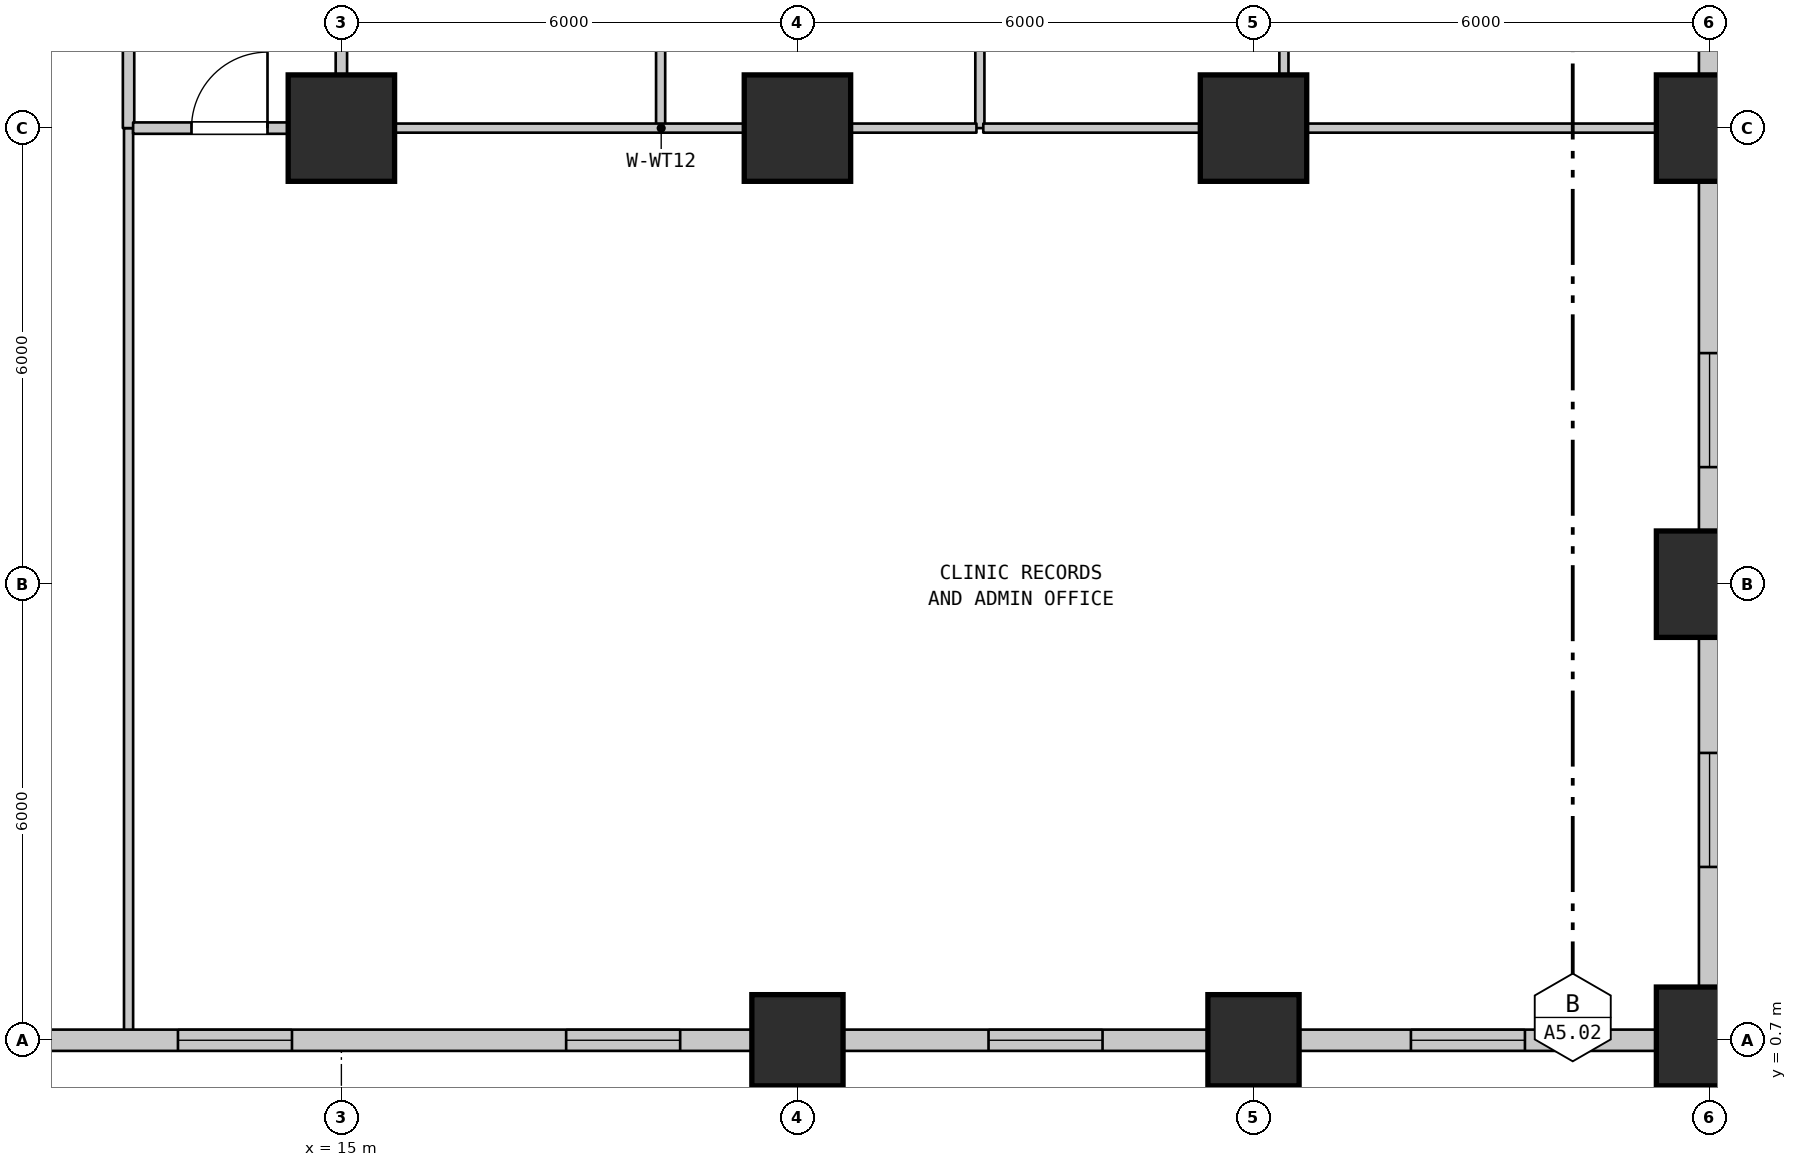
"""IFC4 building model, lengths in metres.
Left out: names, types, materials, properties, quantities, classifications, styles, units other than length and angle.
Written with IfcOpenShell. Run it as: python <this file> out.ifc"""

import sys

from ifc_helpers import new_model, si_unit, direction, frame, frame_2d, origin, origin_2d, place, context, subcontext, project, spatial, rectangle, extrude, element, fill, save


model = new_model("IFC4")
c1 = context("Model", 3, precision=1e-05, world=origin(), true_north=direction((0.0, 1.0)))
c2 = subcontext(c1, "Body", "Model", "MODEL_VIEW")
j1 = project(units=[si_unit("LENGTHUNIT", "METRE"), si_unit("PLANEANGLEUNIT", "RADIAN")], contexts=[c1])
p1 = place(None, origin())
s1 = spatial("IfcSite", under=j1, at=p1, CompositionType="ELEMENT")
p2 = place(p1, origin())
s2 = spatial("IfcBuilding", under=s1, at=p2, CompositionType="ELEMENT")
p3 = place(p2, frame((0.0, 0.0, 13.0)))
s3 = spatial("IfcBuildingStorey", under=s2, at=p3, CompositionType="ELEMENT", Elevation=13.0)
p4 = place(p3, frame((15.0, 12.7, 0.0), z_axis=(0.0, 0.0, 1.0), x_axis=(1.0, 0.0, 0.0)))
e1 = element("IfcColumn", 1, at=p4, inside=s3, PredefinedType="COLUMN", context=c2, shape_type="SweptSolid", body=[
    extrude(rectangle(XDim=1.4, YDim=1.4, at=origin_2d()), origin(), (0.0, 0.0, 1.0), 6.0),
])
p5 = place(p3, frame((21.0, 0.7, 0.0), z_axis=(0.0, 0.0, 1.0), x_axis=(1.0, 0.0, 0.0)))
e2 = element("IfcColumn", 2, at=p5, inside=s3, PredefinedType="PILASTER", context=c2, shape_type="SweptSolid", body=[
    extrude(rectangle(XDim=1.2, YDim=1.2, at=origin_2d()), origin(), (0.0, 0.0, 1.0), 6.0),
])
p6 = place(p3, frame((21.0, 12.7, 0.0), z_axis=(0.0, 0.0, 1.0), x_axis=(1.0, 0.0, 0.0)))
e3 = element("IfcColumn", 3, at=p6, inside=s3, PredefinedType="COLUMN", context=c2, shape_type="SweptSolid", body=[
    extrude(rectangle(XDim=1.4, YDim=1.4, at=origin_2d()), origin(), (0.0, 0.0, 1.0), 6.0),
])
p7 = place(p3, frame((27.0, 0.7, 0.0), z_axis=(0.0, 0.0, 1.0), x_axis=(1.0, 0.0, 0.0)))
e4 = element("IfcColumn", 4, at=p7, inside=s3, PredefinedType="PILASTER", context=c2, shape_type="SweptSolid", body=[
    extrude(rectangle(XDim=1.2, YDim=1.2, at=origin_2d()), origin(), (0.0, 0.0, 1.0), 6.0),
])
p8 = place(p3, frame((27.0, 12.7, 0.0), z_axis=(0.0, 0.0, 1.0), x_axis=(1.0, 0.0, 0.0)))
e5 = element("IfcColumn", 5, at=p8, inside=s3, PredefinedType="COLUMN", context=c2, shape_type="SweptSolid", body=[
    extrude(rectangle(XDim=1.4, YDim=1.4, at=origin_2d()), origin(), (0.0, 0.0, 1.0), 6.0),
])
for number, where, z_axis, x_axis in (
    (6, (33.0, 0.7, 0.0), (0.0, 0.0, 1.0), (1.0, 0.0, 0.0)),
    (7, (33.0, 6.7, 0.0), (0.0, 0.0, 1.0), (1.0, 0.0, 0.0)),
    (8, (33.0, 12.7, 0.0), (0.0, 0.0, 1.0), (1.0, 0.0, 0.0)),
):
    element("IfcColumn", number, at=place(p3, frame(where, z_axis=z_axis, x_axis=x_axis)), inside=s3, PredefinedType="PILASTER", context=c2, shape_type="SweptSolid", body=[
        extrude(rectangle(XDim=1.4, YDim=1.4, at=origin_2d()), origin(), (0.0, 0.0, 1.0), 6.0),
    ])
p9 = place(p3, frame((33.0, 0.7, 0.0), z_axis=(0.0, 0.0, 1.0), x_axis=(-1.0, 0.0, 0.0)))
e9 = element("IfcWall", 9, at=p9, inside=s3, PredefinedType="STANDARD", context=c2, shape_type="SweptSolid", body=[
    extrude(rectangle(XDim=6.0, YDim=0.28, at=frame_2d((3.0, 0.0))), origin(), (0.0, 0.0, 1.0), 4.98),
])
p10 = place(p9, frame((2.429, 0.0, 0.95)))
e10 = element("IfcOpeningElement", 10, at=p10, cuts=e9, PredefinedType="OPENING", context=c2, shape_type="SweptSolid", body=[
    extrude(rectangle(XDim=1.5, YDim=1.8, at=frame_2d((0.75, 0.9))), frame((0.0, 0.15, 0.0), z_axis=(0.0, -1.0, 0.0), x_axis=(1.0, 0.0, 0.0)), (0.0, 0.0, 1.0), 0.3),
])
p11 = place(p3, frame((12.2, 0.71, 0.0), z_axis=(0.0, 0.0, 1.0), x_axis=(0.0, 1.0, 0.0)))
e11 = element("IfcWall", 11, at=p11, inside=s3, PredefinedType="PARTITIONING", context=c2, shape_type="SweptSolid", body=[
    extrude(rectangle(XDim=11.99, YDim=0.12, at=frame_2d((5.995, 0.0))), origin(), (0.0, 0.0, 1.0), 5.58),
])
p12 = place(p3, frame((12.2, 12.7, 0.0), z_axis=(0.0, 0.0, 1.0), x_axis=(0.0, 1.0, 0.0)))
e12 = element("IfcWall", 12, at=p12, inside=s3, PredefinedType="STANDARD", context=c2, shape_type="SweptSolid", body=[
    extrude(rectangle(XDim=4.8, YDim=0.15, at=frame_2d((2.4, 0.0))), origin(), (0.0, 0.0, 1.0), 5.58),
])
p13 = place(p12, frame((1.529, 0.0, 0.0)))
e13 = element("IfcOpeningElement", 13, at=p13, cuts=e12, PredefinedType="OPENING", context=c2, shape_type="SweptSolid", body=[
    extrude(rectangle(XDim=1.45, YDim=2.2, at=frame_2d((0.725, 1.1))), frame((0.0, 0.085, 0.0), z_axis=(0.0, -1.0, 0.0), x_axis=(1.0, 0.0, 0.0)), (0.0, 0.0, 1.0), 0.17),
])
p14 = place(p3, frame((15.0, 12.7, 0.0), z_axis=(0.0, 0.0, 1.0), x_axis=(0.0, 1.0, 0.0)))
e14 = element("IfcWall", 14, at=p14, inside=s3, PredefinedType="STANDARD", context=c2, shape_type="SweptSolid", body=[
    extrude(rectangle(XDim=4.8, YDim=0.15, at=frame_2d((2.4, 0.0))), origin(), (0.0, 0.0, 1.0), 5.08),
])
for number, where, z_axis, x_axis in (
    (15, (19.2, 12.7, 0.0), (0.0, 0.0, 1.0), (0.0, 1.0, 0.0)),
    (16, (23.4, 12.7, 0.0), (0.0, 0.0, 1.0), (0.0, 1.0, 0.0)),
    (17, (27.4, 12.7, 0.0), (0.0, 0.0, 1.0), (0.0, 1.0, 0.0)),
):
    element("IfcWall", number, at=place(p3, frame(where, z_axis=z_axis, x_axis=x_axis)), inside=s3, PredefinedType="PARTITIONING", context=c2, shape_type="SweptSolid", body=[
        extrude(rectangle(XDim=4.8, YDim=0.12, at=frame_2d((2.4, 0.0))), origin(), (0.0, 0.0, 1.0), 5.58),
    ])
p15 = place(p3, frame((12.26, 12.7, 0.0), z_axis=(0.0, 0.0, 1.0), x_axis=(1.0, 0.0, 0.0)))
e18 = element("IfcWall", 18, at=p15, inside=s3, PredefinedType="STANDARD", context=c2, shape_type="SweptSolid", body=[
    extrude(rectangle(XDim=2.68, YDim=0.15, at=frame_2d((1.34, 0.0))), origin(), (0.0, 0.0, 1.0), 5.58),
])
p16 = place(p15, frame((0.768, 0.0, 0.0)))
e19 = element("IfcOpeningElement", 19, at=p16, cuts=e18, PredefinedType="OPENING", context=c2, shape_type="SweptSolid", body=[
    extrude(rectangle(XDim=1.0, YDim=2.15, at=frame_2d((0.5, 1.075))), frame((0.0, 0.085, 0.0), z_axis=(0.0, -1.0, 0.0), x_axis=(1.0, 0.0, 0.0)), (0.0, 0.0, 1.0), 0.17),
])
p17 = place(p3, frame((15.06, 12.7, 0.0), z_axis=(0.0, 0.0, 1.0), x_axis=(1.0, 0.0, 0.0)))
e20 = element("IfcWall", 20, at=p17, inside=s3, PredefinedType="PARTITIONING", context=c2, shape_type="SweptSolid", body=[
    extrude(rectangle(XDim=8.295, YDim=0.12, at=frame_2d((4.147, 0.0))), origin(), (0.0, 0.0, 1.0), 4.98),
])
p18 = place(p3, frame((23.445, 12.7, 0.0), z_axis=(0.0, 0.0, 1.0), x_axis=(1.0, 0.0, 0.0)))
e21 = element("IfcWall", 21, at=p18, inside=s3, PredefinedType="PARTITIONING", context=c2, shape_type="SweptSolid", body=[
    extrude(rectangle(XDim=3.91, YDim=0.12, at=frame_2d((1.955, 0.0))), origin(), (0.0, 0.0, 1.0), 4.98),
])
p19 = place(p3, frame((27.445, 12.7, 0.0), z_axis=(0.0, 0.0, 1.0), x_axis=(1.0, 0.0, 0.0)))
e22 = element("IfcWall", 22, at=p19, inside=s3, PredefinedType="PARTITIONING", context=c2, shape_type="SweptSolid", body=[
    extrude(rectangle(XDim=5.545, YDim=0.12, at=frame_2d((2.772, 0.0))), origin(), (0.0, 0.0, 1.0), 4.98),
])
p20 = place(p3, frame((33.0, 37.9, 0.0), z_axis=(0.0, 0.0, 1.0), x_axis=(0.0, -1.0, 0.0)))
e23 = element("IfcWall", 23, at=p20, inside=s3, PredefinedType="STANDARD", context=c2, shape_type="SweptSolid", body=[
    extrude(rectangle(XDim=37.2, YDim=0.28, at=frame_2d((18.6, 0.0))), origin(), (0.0, 0.0, 1.0), 5.08),
])
p21 = place(p20, frame((1.86, 0.0, 0.95)))
e24 = element("IfcOpeningElement", 24, at=p21, cuts=e23, PredefinedType="OPENING", context=c2, shape_type="SweptSolid", body=[
    extrude(rectangle(XDim=1.5, YDim=1.8, at=frame_2d((0.75, 0.9))), frame((0.0, 0.15, 0.0), z_axis=(0.0, -1.0, 0.0), x_axis=(1.0, 0.0, 0.0)), (0.0, 0.0, 1.0), 0.3),
])
p22 = place(p20, frame((7.12, 0.0, 0.95)))
e25 = element("IfcOpeningElement", 25, at=p22, cuts=e23, PredefinedType="OPENING", context=c2, shape_type="SweptSolid", body=[
    extrude(rectangle(XDim=1.5, YDim=1.8, at=frame_2d((0.75, 0.9))), frame((0.0, 0.15, 0.0), z_axis=(0.0, -1.0, 0.0), x_axis=(1.0, 0.0, 0.0)), (0.0, 0.0, 1.0), 0.3),
])
p23 = place(p20, frame((12.38, 0.0, 0.95)))
e26 = element("IfcOpeningElement", 26, at=p23, cuts=e23, PredefinedType="OPENING", context=c2, shape_type="SweptSolid", body=[
    extrude(rectangle(XDim=1.5, YDim=1.8, at=frame_2d((0.75, 0.9))), frame((0.0, 0.15, 0.0), z_axis=(0.0, -1.0, 0.0), x_axis=(1.0, 0.0, 0.0)), (0.0, 0.0, 1.0), 0.3),
])
p24 = place(p20, frame((17.19, 0.0, 0.95)))
e27 = element("IfcOpeningElement", 27, at=p24, cuts=e23, PredefinedType="OPENING", context=c2, shape_type="SweptSolid", body=[
    extrude(rectangle(XDim=1.5, YDim=1.8, at=frame_2d((0.75, 0.9))), frame((0.0, 0.15, 0.0), z_axis=(0.0, -1.0, 0.0), x_axis=(1.0, 0.0, 0.0)), (0.0, 0.0, 1.0), 0.3),
])
p25 = place(p20, frame((22.45, 0.0, 0.95)))
e28 = element("IfcOpeningElement", 28, at=p25, cuts=e23, PredefinedType="OPENING", context=c2, shape_type="SweptSolid", body=[
    extrude(rectangle(XDim=1.5, YDim=1.8, at=frame_2d((0.75, 0.9))), frame((0.0, 0.15, 0.0), z_axis=(0.0, -1.0, 0.0), x_axis=(1.0, 0.0, 0.0)), (0.0, 0.0, 1.0), 0.3),
])
p26 = place(p20, frame((28.16, 0.0, 0.95)))
e29 = element("IfcOpeningElement", 29, at=p26, cuts=e23, PredefinedType="OPENING", context=c2, shape_type="SweptSolid", body=[
    extrude(rectangle(XDim=1.5, YDim=1.8, at=frame_2d((0.75, 0.9))), frame((0.0, 0.15, 0.0), z_axis=(0.0, -1.0, 0.0), x_axis=(1.0, 0.0, 0.0)), (0.0, 0.0, 1.0), 0.3),
])
p27 = place(p20, frame((33.42, 0.0, 0.95)))
e30 = element("IfcOpeningElement", 30, at=p27, cuts=e23, PredefinedType="OPENING", context=c2, shape_type="SweptSolid", body=[
    extrude(rectangle(XDim=1.5, YDim=1.8, at=frame_2d((0.75, 0.9))), frame((0.0, 0.15, 0.0), z_axis=(0.0, -1.0, 0.0), x_axis=(1.0, 0.0, 0.0)), (0.0, 0.0, 1.0), 0.3),
])
p28 = place(p3, frame((27.0, 0.7, 0.0), z_axis=(0.0, 0.0, 1.0), x_axis=(-1.0, 0.0, 0.0)))
e31 = element("IfcWall", 31, at=p28, inside=s3, PredefinedType="STANDARD", context=c2, shape_type="SweptSolid", body=[
    extrude(rectangle(XDim=22.586, YDim=0.28, at=frame_2d((11.293, 0.0))), origin(), (0.0, 0.0, 1.0), 5.58),
])
p29 = place(p28, frame((1.986, 0.0, 0.95)))
e32 = element("IfcOpeningElement", 32, at=p29, cuts=e31, PredefinedType="OPENING", context=c2, shape_type="SweptSolid", body=[
    extrude(rectangle(XDim=1.5, YDim=1.8, at=frame_2d((0.75, 0.9))), frame((0.0, 0.15, 0.0), z_axis=(0.0, -1.0, 0.0), x_axis=(1.0, 0.0, 0.0)), (0.0, 0.0, 1.0), 0.3),
])
p30 = place(p28, frame((7.543, 0.0, 0.95)))
e33 = element("IfcOpeningElement", 33, at=p30, cuts=e31, PredefinedType="OPENING", context=c2, shape_type="SweptSolid", body=[
    extrude(rectangle(XDim=1.5, YDim=1.8, at=frame_2d((0.75, 0.9))), frame((0.0, 0.15, 0.0), z_axis=(0.0, -1.0, 0.0), x_axis=(1.0, 0.0, 0.0)), (0.0, 0.0, 1.0), 0.3),
])
p31 = place(p28, frame((12.65, 0.0, 0.95)))
e34 = element("IfcOpeningElement", 34, at=p31, cuts=e31, PredefinedType="OPENING", context=c2, shape_type="SweptSolid", body=[
    extrude(rectangle(XDim=1.5, YDim=1.8, at=frame_2d((0.75, 0.9))), frame((0.0, 0.15, 0.0), z_axis=(0.0, -1.0, 0.0), x_axis=(1.0, 0.0, 0.0)), (0.0, 0.0, 1.0), 0.3),
])
p32 = place(p28, frame((18.657, 0.0, 0.95)))
e35 = element("IfcOpeningElement", 35, at=p32, cuts=e31, PredefinedType="OPENING", context=c2, shape_type="SweptSolid", body=[
    extrude(rectangle(XDim=1.5, YDim=1.8, at=frame_2d((0.75, 0.9))), frame((0.0, 0.15, 0.0), z_axis=(0.0, -1.0, 0.0), x_axis=(1.0, 0.0, 0.0)), (0.0, 0.0, 1.0), 0.3),
])
p33 = place(p26, origin())
e36 = element("IfcWindow", 36, at=p33, inside=s3, PartitioningType="SINGLE_PANEL", PredefinedType="WINDOW", context=c2, shape_type="SweptSolid", body=[
    extrude(rectangle(XDim=1.5, YDim=1.8, at=frame_2d((0.75, 0.9))), frame((0.0, 0.03, 0.0), z_axis=(0.0, -1.0, 0.0), x_axis=(1.0, 0.0, 0.0)), (0.0, 0.0, 1.0), 0.06),
])
fill(e29, e36)
p34 = place(p27, origin())
e37 = element("IfcWindow", 37, at=p34, inside=s3, PartitioningType="SINGLE_PANEL", PredefinedType="WINDOW", context=c2, shape_type="SweptSolid", body=[
    extrude(rectangle(XDim=1.5, YDim=1.8, at=frame_2d((0.75, 0.9))), frame((0.0, 0.03, 0.0), z_axis=(0.0, -1.0, 0.0), x_axis=(1.0, 0.0, 0.0)), (0.0, 0.0, 1.0), 0.06),
])
fill(e30, e37)
p35 = place(p10, origin())
e38 = element("IfcWindow", 38, at=p35, inside=s3, PartitioningType="SINGLE_PANEL", PredefinedType="WINDOW", context=c2, shape_type="SweptSolid", body=[
    extrude(rectangle(XDim=1.5, YDim=1.8, at=frame_2d((0.75, 0.9))), frame((0.0, 0.03, 0.0), z_axis=(0.0, -1.0, 0.0), x_axis=(1.0, 0.0, 0.0)), (0.0, 0.0, 1.0), 0.06),
])
fill(e10, e38)
p36 = place(p29, origin())
e39 = element("IfcWindow", 39, at=p36, inside=s3, PartitioningType="SINGLE_PANEL", PredefinedType="WINDOW", context=c2, shape_type="SweptSolid", body=[
    extrude(rectangle(XDim=1.5, YDim=1.8, at=frame_2d((0.75, 0.9))), frame((0.0, 0.03, 0.0), z_axis=(0.0, -1.0, 0.0), x_axis=(1.0, 0.0, 0.0)), (0.0, 0.0, 1.0), 0.06),
])
fill(e32, e39)
p37 = place(p30, origin())
e40 = element("IfcWindow", 40, at=p37, inside=s3, PartitioningType="SINGLE_PANEL", PredefinedType="WINDOW", context=c2, shape_type="SweptSolid", body=[
    extrude(rectangle(XDim=1.5, YDim=1.8, at=frame_2d((0.75, 0.9))), frame((0.0, 0.03, 0.0), z_axis=(0.0, -1.0, 0.0), x_axis=(1.0, 0.0, 0.0)), (0.0, 0.0, 1.0), 0.06),
])
fill(e33, e40)
p38 = place(p31, origin())
e41 = element("IfcWindow", 41, at=p38, inside=s3, PartitioningType="SINGLE_PANEL", PredefinedType="WINDOW", context=c2, shape_type="SweptSolid", body=[
    extrude(rectangle(XDim=1.5, YDim=1.8, at=frame_2d((0.75, 0.9))), frame((0.0, 0.03, 0.0), z_axis=(0.0, -1.0, 0.0), x_axis=(1.0, 0.0, 0.0)), (0.0, 0.0, 1.0), 0.06),
])
fill(e34, e41)
p39 = place(p16, origin())
e42 = element("IfcDoor", 42, at=p39, inside=s3, OperationType="SINGLE_SWING_RIGHT", PredefinedType="DOOR", context=c2, shape_type="SweptSolid", body=[
    extrude(rectangle(XDim=1.0, YDim=2.15, at=frame_2d((0.5, 1.075))), frame((0.0, 0.025, 0.0), z_axis=(0.0, -1.0, 0.0), x_axis=(1.0, 0.0, 0.0)), (0.0, 0.0, 1.0), 0.05),
])
fill(e19, e42)
save(model, sys.argv[1])
